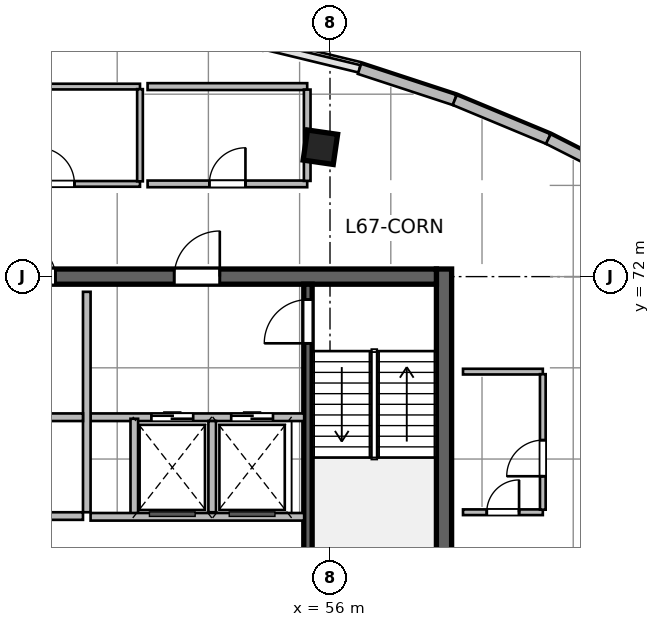
"""IFC4 building model, lengths in metres.
Left out: names, types, materials, properties, quantities, classifications, styles, units other than length and angle.
Written with IfcOpenShell. Run it as: python <this file> out.ifc"""

import sys

from ifc_helpers import new_model, si_unit, direction, frame, frame_2d, origin, origin_2d, place, context, subcontext, project, spatial, rectangle, extrude, source, transform, mapped, element, fill, save


model = new_model("IFC4")
c1 = context("Model", 3, precision=1e-05, world=origin(), true_north=direction((0.0, 1.0)))
c2 = subcontext(c1, "Body", "Model", "MODEL_VIEW")
j1 = project(units=[si_unit("LENGTHUNIT", "METRE"), si_unit("PLANEANGLEUNIT", "RADIAN")], contexts=[c1])
p1 = place(None, origin())
s1 = spatial("IfcSite", under=j1, at=p1, CompositionType="ELEMENT")
p2 = place(p1, origin())
s2 = spatial("IfcBuilding", under=s1, at=p2, CompositionType="ELEMENT")
p3 = place(p2, frame((0.0, 0.0, 275.7)))
s3 = spatial("IfcBuildingStorey", under=s2, at=p3, CompositionType="ELEMENT", Elevation=275.7)
m1 = source(origin(), c2, "Body", "SweptSolid", [
    extrude(rectangle(XDim=12.0, YDim=0.4, at=frame_2d((6.0, 0.0))), origin(), (0.0, 0.0, 1.0), 3.9),
])
p4 = place(p3, frame((59.0, 60.2, 0.0), z_axis=(0.0, 0.0, 1.0), x_axis=(0.0, 1.0, 0.0)))
e1 = element("IfcWall", 1, at=p4, inside=s3, PredefinedType="SHEAR", context=c2, shape_type="MappedRepresentation", body=[
    mapped(m1, transform((0.0, 0.0, 0.0), scale=1.0)),
])
m2 = source(origin(), c2, "Body", "SweptSolid", [
    extrude(rectangle(XDim=21.6, YDim=0.4, at=frame_2d((10.8, 0.0))), origin(), (0.0, 0.0, 1.0), 3.9),
])
p5 = place(p3, frame((37.2, 72.0, 0.0), z_axis=(0.0, 0.0, 1.0), x_axis=(1.0, 0.0, 0.0)))
e2 = element("IfcWall", 2, at=p5, inside=s3, PredefinedType="SHEAR", context=c2, shape_type="MappedRepresentation", body=[
    mapped(m2, transform((0.0, 0.0, 0.0), scale=1.0)),
])
p6 = place(p5, frame((1.2, 0.0, 0.0)))
e3 = element("IfcOpeningElement", 3, at=p6, cuts=e2, PredefinedType="OPENING", context=c2, shape_type="SweptSolid", body=[
    extrude(rectangle(XDim=0.9, YDim=2.1, at=frame_2d((0.45, 1.05))), frame((0.0, 0.21, 0.0), z_axis=(0.0, -1.0, 0.0), x_axis=(1.0, 0.0, 0.0)), (0.0, 0.0, 1.0), 0.42),
])
p7 = place(p5, frame((14.7, 0.0, 0.0)))
e4 = element("IfcOpeningElement", 4, at=p7, cuts=e2, PredefinedType="OPENING", context=c2, shape_type="SweptSolid", body=[
    extrude(rectangle(XDim=1.2, YDim=2.15, at=frame_2d((0.6, 1.075))), frame((0.0, 0.21, 0.0), z_axis=(0.0, -1.0, 0.0), x_axis=(1.0, 0.0, 0.0)), (0.0, 0.0, 1.0), 0.42),
])
p8 = place(p5, frame((4.15, 0.0, 0.0)))
e5 = element("IfcOpeningElement", 5, at=p8, cuts=e2, PredefinedType="OPENING", context=c2, shape_type="SweptSolid", body=[
    extrude(rectangle(XDim=1.3, YDim=2.15, at=frame_2d((0.65, 1.075))), frame((0.0, 0.21, 0.0), z_axis=(0.0, -1.0, 0.0), x_axis=(1.0, 0.0, 0.0)), (0.0, 0.0, 1.0), 0.42),
])
p9 = place(p5, frame((6.76, 0.0, 0.0)))
e6 = element("IfcOpeningElement", 6, at=p9, cuts=e2, PredefinedType="OPENING", context=c2, shape_type="SweptSolid", body=[
    extrude(rectangle(XDim=0.85, YDim=2.1, at=frame_2d((0.425, 1.05))), frame((0.0, 0.21, 0.0), z_axis=(0.0, -1.0, 0.0), x_axis=(1.0, 0.0, 0.0)), (0.0, 0.0, 1.0), 0.42),
])
p10 = place(p5, frame((8.76, 0.0, 0.0)))
e7 = element("IfcOpeningElement", 7, at=p10, cuts=e2, PredefinedType="OPENING", context=c2, shape_type="SweptSolid", body=[
    extrude(rectangle(XDim=0.85, YDim=2.1, at=frame_2d((0.425, 1.05))), frame((0.0, 0.21, 0.0), z_axis=(0.0, -1.0, 0.0), x_axis=(1.0, 0.0, 0.0)), (0.0, 0.0, 1.0), 0.42),
])
p11 = place(p5, frame((10.725, 0.0, 0.0)))
e8 = element("IfcOpeningElement", 8, at=p11, cuts=e2, PredefinedType="OPENING", context=c2, shape_type="SweptSolid", body=[
    extrude(rectangle(XDim=0.85, YDim=2.1, at=frame_2d((0.425, 1.05))), frame((0.0, 0.21, 0.0), z_axis=(0.0, -1.0, 0.0), x_axis=(1.0, 0.0, 0.0)), (0.0, 0.0, 1.0), 0.42),
])
m3 = source(origin(), c2, "Body", "SweptSolid", [
    extrude(rectangle(XDim=11.2, YDim=0.22, at=frame_2d((5.6, 0.0))), origin(), (0.0, 0.0, 1.0), 3.9),
])
p12 = place(p3, frame((55.42, 60.6, 0.0), z_axis=(0.0, 0.0, 1.0), x_axis=(0.0, 1.0, 0.0)))
e9 = element("IfcWall", 9, at=p12, inside=s3, PredefinedType="SHEAR", context=c2, shape_type="MappedRepresentation", body=[
    mapped(m3, transform((0.0, 0.0, 0.0), scale=1.0)),
])
p13 = place(p12, frame((9.645, 0.0, 0.0)))
e10 = element("IfcOpeningElement", 10, at=p13, cuts=e9, PredefinedType="OPENING", context=c2, shape_type="SweptSolid", body=[
    extrude(rectangle(XDim=1.15, YDim=2.15, at=frame_2d((0.575, 1.075))), frame((0.0, 0.12, 0.0), z_axis=(0.0, -1.0, 0.0), x_axis=(1.0, 0.0, 0.0)), (0.0, 0.0, 1.0), 0.24),
])
m4 = source(origin(), c2, "Body", "SweptSolid", [
    extrude(rectangle(XDim=0.8, YDim=0.8, at=origin_2d()), origin(), (0.0, 0.0, 1.0), 3.9),
])
p14 = place(p3, frame((55.747, 75.404, 0.0), z_axis=(0.0, 0.0, 1.0), x_axis=(0.143492621991, 0.98965138682, 0.0)))
e11 = element("IfcColumn", 11, at=p14, inside=s3, PredefinedType="COLUMN", context=c2, shape_type="MappedRepresentation", body=[
    mapped(m4, transform((0.0, 0.0, 0.0), scale=1.0)),
])
m5 = source(origin(), c2, "Body", "SweptSolid", [
    extrude(rectangle(XDim=2.636, YDim=0.28, at=frame_2d((1.318, 0.0))), origin(), (0.0, 0.0, 1.0), 3.64),
])
p15 = place(p3, frame((56.777, 77.467, 0.0), z_axis=(0.0, 0.0, 1.0), x_axis=(0.950200321617, -0.311639774097, 0.0)))
e12 = element("IfcWall", 12, at=p15, inside=s3, PredefinedType="SOLIDWALL", context=c2, shape_type="MappedRepresentation", body=[
    mapped(m5, transform((0.0, 0.0, 0.0), scale=1.0)),
])
m6 = source(origin(), c2, "Body", "SweptSolid", [
    extrude(rectangle(XDim=2.668, YDim=0.28, at=frame_2d((1.334, 0.0))), origin(), (0.0, 0.0, 1.0), 3.64),
])
p16 = place(p3, frame((59.281, 76.645, 0.0), z_axis=(0.0, 0.0, 1.0), x_axis=(0.923290633029, -0.384102078828, 0.0)))
e13 = element("IfcWall", 13, at=p16, inside=s3, PredefinedType="SOLIDWALL", context=c2, shape_type="MappedRepresentation", body=[
    mapped(m6, transform((0.0, 0.0, 0.0), scale=1.0)),
])
m7 = source(origin(), c2, "Body", "SweptSolid", [
    extrude(rectangle(XDim=2.706, YDim=0.28, at=frame_2d((1.353, 0.0))), origin(), (0.0, 0.0, 1.0), 3.64),
])
p17 = place(p3, frame((61.745, 75.62, 0.0), z_axis=(0.0, 0.0, 1.0), x_axis=(0.891648836287, -0.452727680564, 0.0)))
e14 = element("IfcWall", 14, at=p17, inside=s3, PredefinedType="SOLIDWALL", context=c2, shape_type="MappedRepresentation", body=[
    mapped(m7, transform((0.0, 0.0, 0.0), scale=1.0)),
])
m8 = source(origin(), c2, "Body", "SweptSolid", [
    extrude(rectangle(XDim=5.62, YDim=0.2, at=frame_2d((2.81, 0.0))), origin(), (0.0, 0.0, 1.0), 3.64),
])
p18 = place(p3, frame((49.7, 68.3, 0.0), z_axis=(0.0, 0.0, 1.0), x_axis=(1.0, 0.0, 0.0)))
e15 = element("IfcWall", 15, at=p18, inside=s3, PredefinedType="SOLIDWALL", context=c2, shape_type="MappedRepresentation", body=[
    mapped(m8, transform((0.0, 0.0, 0.0), scale=1.0)),
])
p19 = place(p18, frame((1.6, 0.0, 0.0)))
e16 = element("IfcOpeningElement", 16, at=p19, cuts=e15, PredefinedType="OPENING", context=c2, shape_type="SweptSolid", body=[
    extrude(rectangle(XDim=1.1, YDim=2.15, at=frame_2d((0.55, 1.075))), frame((0.0, 0.11, 0.0), z_axis=(0.0, -1.0, 0.0), x_axis=(1.0, 0.0, 0.0)), (0.0, 0.0, 1.0), 0.22),
])
p20 = place(p18, frame((3.7, 0.0, 0.0)))
e17 = element("IfcOpeningElement", 17, at=p20, cuts=e15, PredefinedType="OPENING", context=c2, shape_type="SweptSolid", body=[
    extrude(rectangle(XDim=1.1, YDim=2.15, at=frame_2d((0.55, 1.075))), frame((0.0, 0.11, 0.0), z_axis=(0.0, -1.0, 0.0), x_axis=(1.0, 0.0, 0.0)), (0.0, 0.0, 1.0), 0.22),
])
m9 = source(origin(), c2, "Body", "SweptSolid", [
    extrude(rectangle(XDim=5.8, YDim=0.2, at=frame_2d((2.9, 0.0))), origin(), (0.0, 0.0, 1.0), 3.64),
])
p21 = place(p3, frame((49.6, 65.8, 0.0), z_axis=(0.0, 0.0, 1.0), x_axis=(0.0, 1.0, 0.0)))
e18 = element("IfcWall", 18, at=p21, inside=s3, PredefinedType="SOLIDWALL", context=c2, shape_type="MappedRepresentation", body=[
    mapped(m9, transform((0.0, 0.0, 0.0), scale=1.0)),
])
m10 = source(origin(), c2, "Body", "SweptSolid", [
    extrude(rectangle(XDim=2.58, YDim=0.2, at=frame_2d((1.29, 0.0))), origin(), (0.0, 0.0, 1.0), 3.64),
])
p22 = place(p3, frame((50.85, 65.68, 0.0), z_axis=(0.0, 0.0, 1.0), x_axis=(0.0, 1.0, 0.0)))
e19 = element("IfcWall", 19, at=p22, inside=s3, PredefinedType="SOLIDWALL", context=c2, shape_type="MappedRepresentation", body=[
    mapped(m10, transform((0.0, 0.0, 0.0), scale=1.0)),
])
m11 = source(origin(), c2, "Body", "SweptSolid", [
    extrude(rectangle(XDim=2.4, YDim=0.2, at=frame_2d((1.2, 0.0))), origin(), (0.0, 0.0, 1.0), 3.64),
])
p23 = place(p3, frame((52.9, 65.8, 0.0), z_axis=(0.0, 0.0, 1.0), x_axis=(0.0, 1.0, 0.0)))
e20 = element("IfcWall", 20, at=p23, inside=s3, PredefinedType="SOLIDWALL", context=c2, shape_type="MappedRepresentation", body=[
    mapped(m11, transform((0.0, 0.0, 0.0), scale=1.0)),
])
p24 = place(p3, frame((49.7, 65.68, 0.0), z_axis=(0.0, 0.0, 1.0), x_axis=(1.0, 0.0, 0.0)))
e21 = element("IfcWall", 21, at=p24, inside=s3, PredefinedType="SOLIDWALL", context=c2, shape_type="MappedRepresentation", body=[
    mapped(m8, transform((0.0, 0.0, 0.0), scale=1.0)),
])
m12 = source(origin(), c2, "Body", "SweptSolid", [
    extrude(rectangle(XDim=8.8, YDim=0.2, at=frame_2d((4.4, 0.0))), origin(), (0.0, 0.0, 1.0), 3.64),
])
p25 = place(p3, frame((40.7, 68.3, 0.0), z_axis=(0.0, 0.0, 1.0), x_axis=(1.0, 0.0, 0.0)))
e22 = element("IfcWall", 22, at=p25, inside=s3, PredefinedType="SOLIDWALL", context=c2, shape_type="MappedRepresentation", body=[
    mapped(m12, transform((0.0, 0.0, 0.0), scale=1.0)),
])
p26 = place(p3, frame((40.7, 65.7, 0.0), z_axis=(0.0, 0.0, 1.0), x_axis=(1.0, 0.0, 0.0)))
e23 = element("IfcWall", 23, at=p26, inside=s3, PredefinedType="SOLIDWALL", context=c2, shape_type="MappedRepresentation", body=[
    mapped(m12, transform((0.0, 0.0, 0.0), scale=1.0)),
])
p27 = place(p26, frame((3.8, 0.0, 0.0)))
e24 = element("IfcOpeningElement", 24, at=p27, cuts=e23, PredefinedType="OPENING", context=c2, shape_type="SweptSolid", body=[
    extrude(rectangle(XDim=0.95, YDim=2.15, at=frame_2d((0.475, 1.075))), frame((0.0, 0.11, 0.0), z_axis=(0.0, -1.0, 0.0), x_axis=(1.0, 0.0, 0.0)), (0.0, 0.0, 1.0), 0.22),
])
m13 = source(origin(), c2, "Body", "SweptSolid", [
    extrude(rectangle(XDim=2.1, YDim=0.15, at=frame_2d((1.05, 0.0))), origin(), (0.0, 0.0, 1.0), 3.64),
])
p28 = place(p3, frame((59.5, 65.8, 0.0), z_axis=(0.0, 0.0, 1.0), x_axis=(1.0, 0.0, 0.0)))
e25 = element("IfcWall", 25, at=p28, inside=s3, PredefinedType="PARTITIONING", context=c2, shape_type="MappedRepresentation", body=[
    mapped(m13, transform((0.0, 0.0, 0.0), scale=1.0)),
])
p29 = place(p28, frame((0.625, 0.0, 0.0)))
e26 = element("IfcOpeningElement", 26, at=p29, cuts=e25, PredefinedType="OPENING", context=c2, shape_type="SweptSolid", body=[
    extrude(rectangle(XDim=0.85, YDim=2.1, at=frame_2d((0.425, 1.05))), frame((0.0, 0.085, 0.0), z_axis=(0.0, -1.0, 0.0), x_axis=(1.0, 0.0, 0.0)), (0.0, 0.0, 1.0), 0.17),
])
p30 = place(p3, frame((59.5, 69.5, 0.0), z_axis=(0.0, 0.0, 1.0), x_axis=(1.0, 0.0, 0.0)))
e27 = element("IfcWall", 27, at=p30, inside=s3, PredefinedType="PARTITIONING", context=c2, shape_type="MappedRepresentation", body=[
    mapped(m13, transform((0.0, 0.0, 0.0), scale=1.0)),
])
m14 = source(origin(), c2, "Body", "SweptSolid", [
    extrude(rectangle(XDim=3.565, YDim=0.15, at=frame_2d((1.783, 0.0))), origin(), (0.0, 0.0, 1.0), 3.64),
])
p31 = place(p3, frame((61.6, 65.867, 0.0), z_axis=(0.0, 0.0, 1.0), x_axis=(0.0, 1.0, 0.0)))
e28 = element("IfcWall", 28, at=p31, inside=s3, PredefinedType="PARTITIONING", context=c2, shape_type="MappedRepresentation", body=[
    mapped(m14, transform((0.0, 0.0, 0.0), scale=1.0)),
])
p32 = place(p31, frame((0.88, 0.0, 0.0)))
e29 = element("IfcOpeningElement", 29, at=p32, cuts=e28, PredefinedType="OPENING", context=c2, shape_type="SweptSolid", body=[
    extrude(rectangle(XDim=0.95, YDim=2.1, at=frame_2d((0.475, 1.05))), frame((0.0, 0.085, 0.0), z_axis=(0.0, -1.0, 0.0), x_axis=(1.0, 0.0, 0.0)), (0.0, 0.0, 1.0), 0.17),
])
m15 = source(origin(), c2, "Body", "SweptSolid", [
    extrude(rectangle(XDim=4.4, YDim=0.15, at=frame_2d((2.2, 0.0))), origin(), (0.0, 0.0, 1.0), 3.64),
])
p33 = place(p3, frame((46.6, 74.44, 0.0), z_axis=(0.0, 0.0, 1.0), x_axis=(1.0, 0.0, 0.0)))
e30 = element("IfcWall", 30, at=p33, inside=s3, PredefinedType="PARTITIONING", context=c2, shape_type="MappedRepresentation", body=[
    mapped(m15, transform((0.0, 0.0, 0.0), scale=1.0)),
])
p34 = place(p33, frame((1.725, 0.0, 0.0)))
e31 = element("IfcOpeningElement", 31, at=p34, cuts=e30, PredefinedType="OPENING", context=c2, shape_type="SweptSolid", body=[
    extrude(rectangle(XDim=0.95, YDim=2.1, at=frame_2d((0.475, 1.05))), frame((0.0, 0.085, 0.0), z_axis=(0.0, -1.0, 0.0), x_axis=(1.0, 0.0, 0.0)), (0.0, 0.0, 1.0), 0.17),
])
p35 = place(p3, frame((46.6, 77.0, 0.0), z_axis=(0.0, 0.0, 1.0), x_axis=(1.0, 0.0, 0.0)))
e32 = element("IfcWall", 32, at=p35, inside=s3, PredefinedType="PARTITIONING", context=c2, shape_type="MappedRepresentation", body=[
    mapped(m15, transform((0.0, 0.0, 0.0), scale=1.0)),
])
m16 = source(origin(), c2, "Body", "SweptSolid", [
    extrude(rectangle(XDim=2.425, YDim=0.15, at=frame_2d((1.212, 0.0))), origin(), (0.0, 0.0, 1.0), 3.64),
])
p36 = place(p3, frame((51.0, 74.508, 0.0), z_axis=(0.0, 0.0, 1.0), x_axis=(0.0, 1.0, 0.0)))
e33 = element("IfcWall", 33, at=p36, inside=s3, PredefinedType="PARTITIONING", context=c2, shape_type="MappedRepresentation", body=[
    mapped(m16, transform((0.0, 0.0, 0.0), scale=1.0)),
])
m17 = source(origin(), c2, "Body", "SweptSolid", [
    extrude(rectangle(XDim=4.2, YDim=0.175, at=frame_2d((2.1, 0.0))), origin(), (0.0, 0.0, 1.0), 3.64),
])
p37 = place(p3, frame((51.2, 74.44, 0.0), z_axis=(0.0, 0.0, 1.0), x_axis=(1.0, 0.0, 0.0)))
e34 = element("IfcWall", 34, at=p37, inside=s3, PredefinedType="PARTITIONING", context=c2, shape_type="MappedRepresentation", body=[
    mapped(m17, transform((0.0, 0.0, 0.0), scale=1.0)),
])
p38 = place(p37, frame((1.625, 0.0, 0.0)))
e35 = element("IfcOpeningElement", 35, at=p38, cuts=e34, PredefinedType="OPENING", context=c2, shape_type="SweptSolid", body=[
    extrude(rectangle(XDim=0.95, YDim=2.12, at=frame_2d((0.475, 1.06))), frame((0.0, 0.098, 0.0), z_axis=(0.0, -1.0, 0.0), x_axis=(1.0, 0.0, 0.0)), (0.0, 0.0, 1.0), 0.195),
])
m18 = source(origin(), c2, "Body", "SweptSolid", [
    extrude(rectangle(XDim=4.2, YDim=0.18, at=frame_2d((2.1, 0.0))), origin(), (0.0, 0.0, 1.0), 3.64),
])
p39 = place(p3, frame((51.2, 77.0, 0.0), z_axis=(0.0, 0.0, 1.0), x_axis=(1.0, 0.0, 0.0)))
e36 = element("IfcWall", 36, at=p39, inside=s3, PredefinedType="PLUMBINGWALL", context=c2, shape_type="MappedRepresentation", body=[
    mapped(m18, transform((0.0, 0.0, 0.0), scale=1.0)),
])
m19 = source(origin(), c2, "Body", "SweptSolid", [
    extrude(rectangle(XDim=2.403, YDim=0.175, at=frame_2d((1.201, 0.0))), origin(), (0.0, 0.0, 1.0), 3.64),
])
p40 = place(p3, frame((55.4, 74.519, 0.0), z_axis=(0.0, 0.0, 1.0), x_axis=(0.0, 1.0, 0.0)))
e37 = element("IfcWall", 37, at=p40, inside=s3, PredefinedType="PARTITIONING", context=c2, shape_type="MappedRepresentation", body=[
    mapped(m19, transform((0.0, 0.0, 0.0), scale=1.0)),
])
m20 = source(origin(), c2, "Body", "SweptSolid", [
    extrude(rectangle(XDim=1.15, YDim=2.15, at=frame_2d((0.575, 1.075))), frame((0.0, 0.025, 0.0), z_axis=(0.0, -1.0, 0.0), x_axis=(1.0, 0.0, 0.0)), (0.0, 0.0, 1.0), 0.05),
])
p41 = place(p13, origin())
e38 = element("IfcDoor", 38, at=p41, inside=s3, OperationType="SINGLE_SWING_LEFT", PredefinedType="DOOR", context=c2, shape_type="MappedRepresentation", body=[
    mapped(m20, transform((0.0, 0.0, 0.0), scale=1.0)),
])
fill(e10, e38)
m21 = source(origin(), c2, "Body", "SweptSolid", [
    extrude(rectangle(XDim=1.2, YDim=2.15, at=frame_2d((0.6, 1.075))), frame((0.0, 0.025, 0.0), z_axis=(0.0, -1.0, 0.0), x_axis=(1.0, 0.0, 0.0)), (0.0, 0.0, 1.0), 0.05),
])
p42 = place(p7, origin())
e39 = element("IfcDoor", 39, at=p42, inside=s3, OperationType="SINGLE_SWING_RIGHT", PredefinedType="DOOR", context=c2, shape_type="MappedRepresentation", body=[
    mapped(m21, transform((0.0, 0.0, 0.0), scale=1.0)),
])
fill(e4, e39)
m22 = source(origin(), c2, "Body", "SweptSolid", [
    extrude(rectangle(XDim=1.1, YDim=2.15, at=frame_2d((0.55, 1.075))), frame((0.0, 0.025, 0.0), z_axis=(0.0, -1.0, 0.0), x_axis=(1.0, 0.0, 0.0)), (0.0, 0.0, 1.0), 0.05),
])
p43 = place(p19, origin())
e40 = element("IfcDoor", 40, at=p43, inside=s3, OperationType="DOUBLE_DOOR_SLIDING", PredefinedType="DOOR", context=c2, shape_type="MappedRepresentation", body=[
    mapped(m22, transform((0.0, 0.0, 0.0), scale=1.0)),
])
fill(e16, e40)
p44 = place(p20, origin())
e41 = element("IfcDoor", 41, at=p44, inside=s3, OperationType="DOUBLE_DOOR_SLIDING", PredefinedType="DOOR", context=c2, shape_type="MappedRepresentation", body=[
    mapped(m22, transform((0.0, 0.0, 0.0), scale=1.0)),
])
fill(e17, e41)
m23 = source(origin(), c2, "Body", "SweptSolid", [
    extrude(rectangle(XDim=0.85, YDim=2.1, at=frame_2d((0.425, 1.05))), frame((0.0, 0.025, 0.0), z_axis=(0.0, -1.0, 0.0), x_axis=(1.0, 0.0, 0.0)), (0.0, 0.0, 1.0), 0.05),
])
p45 = place(p11, origin())
e42 = element("IfcDoor", 42, at=p45, inside=s3, OperationType="SINGLE_SWING_LEFT", PredefinedType="DOOR", context=c2, shape_type="MappedRepresentation", body=[
    mapped(m23, transform((0.0, 0.0, 0.0), scale=1.0)),
])
fill(e8, e42)
p46 = place(p29, origin())
e43 = element("IfcDoor", 43, at=p46, inside=s3, OperationType="SINGLE_SWING_RIGHT", PredefinedType="DOOR", context=c2, shape_type="MappedRepresentation", body=[
    mapped(m23, transform((0.0, 0.0, 0.0), scale=1.0)),
])
fill(e26, e43)
m24 = source(origin(), c2, "Body", "SweptSolid", [
    extrude(rectangle(XDim=0.95, YDim=2.1, at=frame_2d((0.475, 1.05))), frame((0.0, 0.025, 0.0), z_axis=(0.0, -1.0, 0.0), x_axis=(1.0, 0.0, 0.0)), (0.0, 0.0, 1.0), 0.05),
])
p47 = place(p34, origin())
e44 = element("IfcDoor", 44, at=p47, inside=s3, OperationType="SINGLE_SWING_LEFT", PredefinedType="DOOR", context=c2, shape_type="MappedRepresentation", body=[
    mapped(m24, transform((0.0, 0.0, 0.0), scale=1.0)),
])
fill(e31, e44)
m25 = source(origin(), c2, "Body", "SweptSolid", [
    extrude(rectangle(XDim=0.95, YDim=2.12, at=frame_2d((0.475, 1.06))), frame((0.0, 0.025, 0.0), z_axis=(0.0, -1.0, 0.0), x_axis=(1.0, 0.0, 0.0)), (0.0, 0.0, 1.0), 0.05),
])
p48 = place(p38, origin())
e45 = element("IfcDoor", 45, at=p48, inside=s3, OperationType="SINGLE_SWING_RIGHT", PredefinedType="DOOR", context=c2, shape_type="MappedRepresentation", body=[
    mapped(m25, transform((0.0, 0.0, 0.0), scale=1.0)),
])
fill(e35, e45)
p49 = place(p32, origin())
e46 = element("IfcDoor", 46, at=p49, inside=s3, OperationType="SINGLE_SWING_LEFT", PredefinedType="DOOR", context=c2, shape_type="MappedRepresentation", body=[
    mapped(m24, transform((0.0, 0.0, 0.0), scale=1.0)),
])
fill(e29, e46)
save(model, sys.argv[1])
